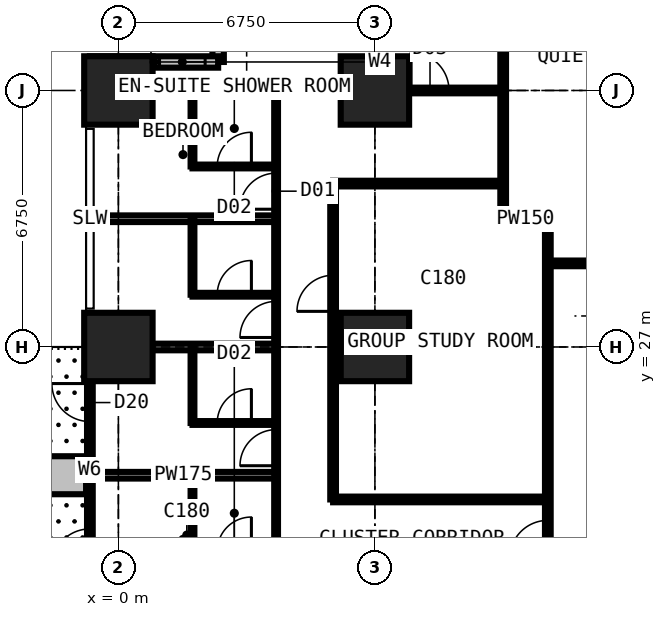
"""IFC4 building model, lengths in metres.
Left out: names, types, materials, properties, quantities, classifications, styles, units other than length and angle.
Written with IfcOpenShell. Run it as: python <this file> out.ifc"""

import sys

from ifc_helpers import new_model, si_unit, direction, frame, frame_2d, origin, origin_2d, place, context, subcontext, project, spatial, rectangle, extrude, element, fill, save


model = new_model("IFC4")
c1 = context("Model", 3, precision=1e-05, world=origin(), true_north=direction((0.0, 1.0)))
c2 = subcontext(c1, "Body", "Model", "MODEL_VIEW")
j1 = project(units=[si_unit("LENGTHUNIT", "METRE"), si_unit("PLANEANGLEUNIT", "RADIAN")], contexts=[c1])
p1 = place(None, origin())
s1 = spatial("IfcSite", under=j1, at=p1, CompositionType="ELEMENT")
p2 = place(p1, origin())
s2 = spatial("IfcBuilding", under=s1, at=p2, CompositionType="ELEMENT")
p3 = place(p2, frame((0.0, 0.0, 46.8)))
s3 = spatial("IfcBuildingStorey", under=s2, at=p3, CompositionType="ELEMENT", Elevation=46.8)
for number, where, z_axis, x_axis in (
    (1, (0.0, 27.0, 0.0), (0.0, 0.0, 1.0), (1.0, 0.0, 0.0)),
    (2, (0.0, 33.75, 0.0), (0.0, 0.0, 1.0), (1.0, 0.0, 0.0)),
    (3, (6.75, 27.0, 0.0), (0.0, 0.0, 1.0), (1.0, 0.0, 0.0)),
    (4, (6.75, 33.75, 0.0), (0.0, 0.0, 1.0), (1.0, 0.0, 0.0)),
):
    element("IfcColumn", number, at=place(p3, frame(where, z_axis=z_axis, x_axis=x_axis)), inside=s3, PredefinedType="COLUMN", context=c2, shape_type="SweptSolid", body=[
        extrude(rectangle(XDim=1.8, YDim=1.8, at=origin_2d()), origin(), (0.0, 0.0, 1.0), 3.6),
    ])
p4 = place(p3, frame((2.625, 37.875, 0.0), z_axis=(0.0, 0.0, 1.0), x_axis=(0.0, -1.0, 0.0)))
e5 = element("IfcWall", 5, at=p4, inside=s3, PredefinedType="SOLIDWALL", context=c2, shape_type="SweptSolid", body=[
    extrude(rectangle(XDim=3.375, YDim=0.3, at=frame_2d((1.688, 0.0))), origin(), (0.0, 0.0, 1.0), 3.375),
])
p5 = place(p4, frame((0.788, 0.0, 0.6)))
e6 = element("IfcOpeningElement", 6, at=p5, cuts=e5, PredefinedType="OPENING", context=c2, shape_type="SweptSolid", body=[
    extrude(rectangle(XDim=1.8, YDim=2.1, at=frame_2d((0.9, 1.05))), frame((0.0, 0.16, 0.0), z_axis=(0.0, -1.0, 0.0), x_axis=(1.0, 0.0, 0.0)), (0.0, 0.0, 1.0), 0.32),
])
p6 = place(p3, frame((2.625, 34.5, 0.0), z_axis=(0.0, 0.0, 1.0), x_axis=(-1.0, 0.0, 0.0)))
e7 = element("IfcWall", 7, at=p6, inside=s3, PredefinedType="SOLIDWALL", context=c2, shape_type="SweptSolid", body=[
    extrude(rectangle(XDim=3.375, YDim=0.3, at=frame_2d((1.688, 0.0))), origin(), (0.0, 0.0, 1.0), 3.375),
])
p7 = place(p6, frame((0.343, 0.0, 0.9)))
e8 = element("IfcOpeningElement", 8, at=p7, cuts=e7, PredefinedType="OPENING", context=c2, shape_type="SweptSolid", body=[
    extrude(rectangle(XDim=1.2, YDim=1.8, at=frame_2d((0.6, 0.9))), frame((0.0, 0.16, 0.0), z_axis=(0.0, -1.0, 0.0), x_axis=(1.0, 0.0, 0.0)), (0.0, 0.0, 1.0), 0.32),
])
p8 = place(p3, frame((-0.75, 20.25, 0.0), z_axis=(0.0, 0.0, 1.0), x_axis=(0.0, 1.0, 0.0)))
e9 = element("IfcWall", 9, at=p8, inside=s3, PredefinedType="SOLIDWALL", context=c2, shape_type="SweptSolid", body=[
    extrude(rectangle(XDim=6.75, YDim=0.15, at=frame_2d((3.375, 0.0))), origin(), (0.0, 0.0, 1.0), 3.375),
])
p9 = place(p8, frame((0.962, 0.0, 0.0)))
e10 = element("IfcOpeningElement", 10, at=p9, cuts=e9, PredefinedType="OPENING", context=c2, shape_type="SweptSolid", body=[
    extrude(rectangle(XDim=1.0, YDim=2.2, at=frame_2d((0.5, 1.1))), frame((0.0, 0.085, 0.0), z_axis=(0.0, -1.0, 0.0), x_axis=(1.0, 0.0, 0.0)), (0.0, 0.0, 1.0), 0.17),
])
p10 = place(p8, frame((2.025, 0.0, 0.9)))
e11 = element("IfcOpeningElement", 11, at=p10, cuts=e9, PredefinedType="OPENING", context=c2, shape_type="SweptSolid", body=[
    extrude(rectangle(XDim=1.2, YDim=1.8, at=frame_2d((0.6, 0.9))), frame((0.0, 0.085, 0.0), z_axis=(0.0, -1.0, 0.0), x_axis=(1.0, 0.0, 0.0)), (0.0, 0.0, 1.0), 0.17),
])
p11 = place(p8, frame((4.788, 0.0, 0.0)))
e12 = element("IfcOpeningElement", 12, at=p11, cuts=e9, PredefinedType="OPENING", context=c2, shape_type="SweptSolid", body=[
    extrude(rectangle(XDim=1.0, YDim=2.2, at=frame_2d((0.5, 1.1))), frame((0.0, 0.085, 0.0), z_axis=(0.0, -1.0, 0.0), x_axis=(1.0, 0.0, 0.0)), (0.0, 0.0, 1.0), 0.17),
])
p12 = place(p8, frame((3.525, 0.0, 0.9)))
e13 = element("IfcOpeningElement", 13, at=p12, cuts=e9, PredefinedType="OPENING", context=c2, shape_type="SweptSolid", body=[
    extrude(rectangle(XDim=1.2, YDim=1.8, at=frame_2d((0.6, 0.9))), frame((0.0, 0.085, 0.0), z_axis=(0.0, -1.0, 0.0), x_axis=(1.0, 0.0, 0.0)), (0.0, 0.0, 1.0), 0.17),
])
p13 = place(p3, frame((-0.85, 23.625, 0.0), z_axis=(0.0, 0.0, 1.0), x_axis=(-1.0, 0.0, 0.0)))
e14 = element("IfcWall", 14, at=p13, inside=s3, PredefinedType="USERDEFINED", context=c2, shape_type="SweptSolid", body=[
    extrude(rectangle(XDim=2.2, YDim=1.0, at=frame_2d((1.1, 0.0))), origin(), (0.0, 0.0, 1.0), 0.9),
])
p14 = place(p3, frame((-0.734, 23.625, 0.0), z_axis=(0.0, 0.0, 1.0), x_axis=(1.0, 0.0, 0.0)))
e15 = element("IfcWall", 15, at=p14, inside=s3, PredefinedType="PARTITIONING", context=c2, shape_type="SweptSolid", body=[
    extrude(rectangle(XDim=4.884, YDim=0.175, at=frame_2d((2.442, 0.0))), origin(), (0.0, 0.0, 1.0), 3.375),
])
p15 = place(p3, frame((-0.734, 27.0, 0.0), z_axis=(0.0, 0.0, 1.0), x_axis=(1.0, 0.0, 0.0)))
e16 = element("IfcWall", 16, at=p15, inside=s3, PredefinedType="PARTITIONING", context=c2, shape_type="SweptSolid", body=[
    extrude(rectangle(XDim=4.884, YDim=0.175, at=frame_2d((2.442, 0.0))), origin(), (0.0, 0.0, 1.0), 2.61),
])
p16 = place(p3, frame((-0.734, 30.375, 0.0), z_axis=(0.0, 0.0, 1.0), x_axis=(1.0, 0.0, 0.0)))
e17 = element("IfcWall", 17, at=p16, inside=s3, PredefinedType="PARTITIONING", context=c2, shape_type="SweptSolid", body=[
    extrude(rectangle(XDim=4.884, YDim=0.175, at=frame_2d((2.442, 0.0))), origin(), (0.0, 0.0, 1.0), 3.375),
])
p17 = place(p3, frame((-0.734, 33.75, 0.0), z_axis=(0.0, 0.0, 1.0), x_axis=(1.0, 0.0, 0.0)))
e18 = element("IfcWall", 18, at=p17, inside=s3, PredefinedType="PARTITIONING", context=c2, shape_type="SweptSolid", body=[
    extrude(rectangle(XDim=10.859, YDim=0.15, at=frame_2d((5.429, 0.0))), origin(), (0.0, 0.0, 1.0), 2.877),
])
p18 = place(p17, frame((8.434, 0.0, 0.0)))
e19 = element("IfcOpeningElement", 19, at=p18, cuts=e18, PredefinedType="OPENING", context=c2, shape_type="SweptSolid", body=[
    extrude(rectangle(XDim=1.0, YDim=2.2, at=frame_2d((0.5, 1.1))), frame((0.0, 0.085, 0.0), z_axis=(0.0, -1.0, 0.0), x_axis=(1.0, 0.0, 0.0)), (0.0, 0.0, 1.0), 0.17),
])
for number, where, z_axis, x_axis in (
    (20, (1.95, 21.625, 0.0), (0.0, 0.0, 1.0), (0.0, 1.0, 0.0)),
    (21, (1.95, 25.0, 0.0), (0.0, 0.0, 1.0), (0.0, 1.0, 0.0)),
):
    element("IfcWall", number, at=place(p3, frame(where, z_axis=z_axis, x_axis=x_axis)), inside=s3, PredefinedType="PARTITIONING", context=c2, shape_type="SweptSolid", body=[
        extrude(rectangle(XDim=2.0, YDim=0.1, at=frame_2d((1.0, 0.0))), origin(), (0.0, 0.0, 1.0), 3.375),
    ])
p19 = place(p3, frame((1.95, 25.0, 0.0), z_axis=(0.0, 0.0, 1.0), x_axis=(1.0, 0.0, 0.0)))
e22 = element("IfcWall", 22, at=p19, inside=s3, PredefinedType="PARTITIONING", context=c2, shape_type="SweptSolid", body=[
    extrude(rectangle(XDim=2.2, YDim=0.1, at=frame_2d((1.1, 0.0))), origin(), (0.0, 0.0, 1.0), 3.375),
])
p20 = place(p19, frame((0.65, 0.0, 0.0)))
e23 = element("IfcOpeningElement", 23, at=p20, cuts=e22, PredefinedType="OPENING", context=c2, shape_type="SweptSolid", body=[
    extrude(rectangle(XDim=0.9, YDim=2.2, at=frame_2d((0.45, 1.1))), frame((0.0, 0.06, 0.0), z_axis=(0.0, -1.0, 0.0), x_axis=(1.0, 0.0, 0.0)), (0.0, 0.0, 1.0), 0.12),
])
p21 = place(p3, frame((1.95, 28.375, 0.0), z_axis=(0.0, 0.0, 1.0), x_axis=(0.0, 1.0, 0.0)))
e24 = element("IfcWall", 24, at=p21, inside=s3, PredefinedType="PARTITIONING", context=c2, shape_type="SweptSolid", body=[
    extrude(rectangle(XDim=2.0, YDim=0.1, at=frame_2d((1.0, 0.0))), origin(), (0.0, 0.0, 1.0), 3.375),
])
p22 = place(p3, frame((1.95, 28.375, 0.0), z_axis=(0.0, 0.0, 1.0), x_axis=(1.0, 0.0, 0.0)))
e25 = element("IfcWall", 25, at=p22, inside=s3, PredefinedType="PARTITIONING", context=c2, shape_type="SweptSolid", body=[
    extrude(rectangle(XDim=2.2, YDim=0.1, at=frame_2d((1.1, 0.0))), origin(), (0.0, 0.0, 1.0), 3.375),
])
p23 = place(p22, frame((0.65, 0.0, 0.0)))
e26 = element("IfcOpeningElement", 26, at=p23, cuts=e25, PredefinedType="OPENING", context=c2, shape_type="SweptSolid", body=[
    extrude(rectangle(XDim=0.9, YDim=2.2, at=frame_2d((0.45, 1.1))), frame((0.0, 0.06, 0.0), z_axis=(0.0, -1.0, 0.0), x_axis=(1.0, 0.0, 0.0)), (0.0, 0.0, 1.0), 0.12),
])
p24 = place(p3, frame((1.95, 31.75, 0.0), z_axis=(0.0, 0.0, 1.0), x_axis=(0.0, 1.0, 0.0)))
e27 = element("IfcWall", 27, at=p24, inside=s3, PredefinedType="PARTITIONING", context=c2, shape_type="SweptSolid", body=[
    extrude(rectangle(XDim=2.0, YDim=0.1, at=frame_2d((1.0, 0.0))), origin(), (0.0, 0.0, 1.0), 3.375),
])
p25 = place(p3, frame((1.95, 31.75, 0.0), z_axis=(0.0, 0.0, 1.0), x_axis=(1.0, 0.0, 0.0)))
e28 = element("IfcWall", 28, at=p25, inside=s3, PredefinedType="PARTITIONING", context=c2, shape_type="SweptSolid", body=[
    extrude(rectangle(XDim=2.2, YDim=0.1, at=frame_2d((1.1, 0.0))), origin(), (0.0, 0.0, 1.0), 3.375),
])
p26 = place(p25, frame((0.65, 0.0, 0.0)))
e29 = element("IfcOpeningElement", 29, at=p26, cuts=e28, PredefinedType="OPENING", context=c2, shape_type="SweptSolid", body=[
    extrude(rectangle(XDim=0.9, YDim=2.2, at=frame_2d((0.45, 1.1))), frame((0.0, 0.06, 0.0), z_axis=(0.0, -1.0, 0.0), x_axis=(1.0, 0.0, 0.0)), (0.0, 0.0, 1.0), 0.12),
])
p27 = place(p3, frame((4.15, 10.125, 0.0), z_axis=(0.0, 0.0, 1.0), x_axis=(0.0, 1.0, 0.0)))
e30 = element("IfcWall", 30, at=p27, inside=s3, PredefinedType="PARTITIONING", context=c2, shape_type="SweptSolid", body=[
    extrude(rectangle(XDim=23.625, YDim=0.1, at=frame_2d((11.812, 0.0))), origin(), (0.0, 0.0, 1.0), 3.375),
])
p28 = place(p27, frame((0.2, 0.0, 0.0)))
e31 = element("IfcOpeningElement", 31, at=p28, cuts=e30, PredefinedType="OPENING", context=c2, shape_type="SweptSolid", body=[
    extrude(rectangle(XDim=0.95, YDim=2.2, at=frame_2d((0.475, 1.1))), frame((0.0, 0.06, 0.0), z_axis=(0.0, -1.0, 0.0), x_axis=(1.0, 0.0, 0.0)), (0.0, 0.0, 1.0), 0.12),
])
p29 = place(p27, frame((3.625, 0.0, 0.0)))
e32 = element("IfcOpeningElement", 32, at=p29, cuts=e30, PredefinedType="OPENING", context=c2, shape_type="SweptSolid", body=[
    extrude(rectangle(XDim=0.95, YDim=2.2, at=frame_2d((0.475, 1.1))), frame((0.0, 0.06, 0.0), z_axis=(0.0, -1.0, 0.0), x_axis=(1.0, 0.0, 0.0)), (0.0, 0.0, 1.0), 0.12),
])
p30 = place(p27, frame((7.0, 0.0, 0.0)))
e33 = element("IfcOpeningElement", 33, at=p30, cuts=e30, PredefinedType="OPENING", context=c2, shape_type="SweptSolid", body=[
    extrude(rectangle(XDim=0.95, YDim=2.2, at=frame_2d((0.475, 1.1))), frame((0.0, 0.06, 0.0), z_axis=(0.0, -1.0, 0.0), x_axis=(1.0, 0.0, 0.0)), (0.0, 0.0, 1.0), 0.12),
])
p31 = place(p27, frame((10.375, 0.0, 0.0)))
e34 = element("IfcOpeningElement", 34, at=p31, cuts=e30, PredefinedType="OPENING", context=c2, shape_type="SweptSolid", body=[
    extrude(rectangle(XDim=0.95, YDim=2.2, at=frame_2d((0.475, 1.1))), frame((0.0, 0.06, 0.0), z_axis=(0.0, -1.0, 0.0), x_axis=(1.0, 0.0, 0.0)), (0.0, 0.0, 1.0), 0.12),
])
p32 = place(p27, frame((13.75, 0.0, 0.0)))
e35 = element("IfcOpeningElement", 35, at=p32, cuts=e30, PredefinedType="OPENING", context=c2, shape_type="SweptSolid", body=[
    extrude(rectangle(XDim=0.95, YDim=2.2, at=frame_2d((0.475, 1.1))), frame((0.0, 0.06, 0.0), z_axis=(0.0, -1.0, 0.0), x_axis=(1.0, 0.0, 0.0)), (0.0, 0.0, 1.0), 0.12),
])
p33 = place(p27, frame((17.125, 0.0, 0.0)))
e36 = element("IfcOpeningElement", 36, at=p33, cuts=e30, PredefinedType="OPENING", context=c2, shape_type="SweptSolid", body=[
    extrude(rectangle(XDim=0.95, YDim=2.2, at=frame_2d((0.475, 1.1))), frame((0.0, 0.06, 0.0), z_axis=(0.0, -1.0, 0.0), x_axis=(1.0, 0.0, 0.0)), (0.0, 0.0, 1.0), 0.12),
])
p34 = place(p27, frame((20.5, 0.0, 0.0)))
e37 = element("IfcOpeningElement", 37, at=p34, cuts=e30, PredefinedType="OPENING", context=c2, shape_type="SweptSolid", body=[
    extrude(rectangle(XDim=0.95, YDim=2.2, at=frame_2d((0.475, 1.1))), frame((0.0, 0.06, 0.0), z_axis=(0.0, -1.0, 0.0), x_axis=(1.0, 0.0, 0.0)), (0.0, 0.0, 1.0), 0.12),
])
p35 = place(p3, frame((5.65, 22.988, 0.0), z_axis=(0.0, 0.0, 1.0), x_axis=(0.0, 1.0, 0.0)))
e38 = element("IfcWall", 38, at=p35, inside=s3, PredefinedType="PARTITIONING", context=c2, shape_type="SweptSolid", body=[
    extrude(rectangle(XDim=8.312, YDim=0.15, at=frame_2d((4.156, 0.0))), origin(), (0.0, 0.0, 1.0), 3.375),
])
p36 = place(p35, frame((4.95, 0.0, 0.0)))
e39 = element("IfcOpeningElement", 39, at=p36, cuts=e38, PredefinedType="OPENING", context=c2, shape_type="SweptSolid", body=[
    extrude(rectangle(XDim=0.95, YDim=2.2, at=frame_2d((0.475, 1.1))), frame((0.0, 0.085, 0.0), z_axis=(0.0, -1.0, 0.0), x_axis=(1.0, 0.0, 0.0)), (0.0, 0.0, 1.0), 0.17),
])
p37 = place(p3, frame((5.65, 22.988, 0.0), z_axis=(0.0, 0.0, 1.0), x_axis=(1.0, 0.0, 0.0)))
e40 = element("IfcWall", 40, at=p37, inside=s3, PredefinedType="PARTITIONING", context=c2, shape_type="SweptSolid", body=[
    extrude(rectangle(XDim=5.65, YDim=0.15, at=frame_2d((2.825, 0.0))), origin(), (0.0, 0.0, 1.0), 3.375),
])
p38 = place(p3, frame((5.65, 31.3, 0.0), z_axis=(0.0, 0.0, 1.0), x_axis=(1.0, 0.0, 0.0)))
e41 = element("IfcWall", 41, at=p38, inside=s3, PredefinedType="PARTITIONING", context=c2, shape_type="SweptSolid", body=[
    extrude(rectangle(XDim=4.475, YDim=0.15, at=frame_2d((2.238, 0.0))), origin(), (0.0, 0.0, 1.0), 3.375),
])
p39 = place(p3, frame((10.125, 30.375, 0.0), z_axis=(0.0, 0.0, 1.0), x_axis=(0.0, 1.0, 0.0)))
e42 = element("IfcWall", 42, at=p39, inside=s3, PredefinedType="PARTITIONING", context=c2, shape_type="SweptSolid", body=[
    extrude(rectangle(XDim=10.859, YDim=0.15, at=frame_2d((5.429, 0.0))), origin(), (0.0, 0.0, 1.0), 3.375),
])
p40 = place(p3, frame((10.125, 30.375, 0.0), z_axis=(0.0, 0.0, 1.0), x_axis=(1.0, 0.0, 0.0)))
e43 = element("IfcWall", 43, at=p40, inside=s3, PredefinedType="PARTITIONING", context=c2, shape_type="SweptSolid", body=[
    extrude(rectangle(XDim=1.175, YDim=0.15, at=frame_2d((0.587, 0.0))), origin(), (0.0, 0.0, 1.0), 3.375),
])
p41 = place(p3, frame((11.3, 11.3, 0.0), z_axis=(0.0, 0.0, 1.0), x_axis=(0.0, 1.0, 0.0)))
e44 = element("IfcWall", 44, at=p41, inside=s3, PredefinedType="PARTITIONING", context=c2, shape_type="SweptSolid", body=[
    extrude(rectangle(XDim=19.075, YDim=0.15, at=frame_2d((9.538, 0.0))), origin(), (0.0, 0.0, 1.0), 3.375),
])
p42 = place(p41, frame((10.137, 0.0, 0.0)))
e45 = element("IfcOpeningElement", 45, at=p42, cuts=e44, PredefinedType="OPENING", context=c2, shape_type="SweptSolid", body=[
    extrude(rectangle(XDim=1.0, YDim=2.2, at=frame_2d((0.5, 1.1))), frame((0.0, 0.085, 0.0), z_axis=(0.0, -1.0, 0.0), x_axis=(1.0, 0.0, 0.0)), (0.0, 0.0, 1.0), 0.17),
])
p43 = place(p3, frame((11.3, 29.2, 0.0), z_axis=(0.0, 0.0, 1.0), x_axis=(1.0, 0.0, 0.0)))
e46 = element("IfcWall", 46, at=p43, inside=s3, PredefinedType="PARTITIONING", context=c2, shape_type="SweptSolid", body=[
    extrude(rectangle(XDim=19.075, YDim=0.15, at=frame_2d((9.538, 0.0))), origin(), (0.0, 0.0, 1.0), 3.375),
])
p44 = place(p43, frame((14.25, 0.0, 0.0)))
e47 = element("IfcOpeningElement", 47, at=p44, cuts=e46, PredefinedType="OPENING", context=c2, shape_type="SweptSolid", body=[
    extrude(rectangle(XDim=1.0, YDim=2.2, at=frame_2d((0.5, 1.1))), frame((0.0, 0.085, 0.0), z_axis=(0.0, -1.0, 0.0), x_axis=(1.0, 0.0, 0.0)), (0.0, 0.0, 1.0), 0.17),
])
p45 = place(p43, frame((16.35, 0.0, 0.0)))
e48 = element("IfcOpeningElement", 48, at=p45, cuts=e46, PredefinedType="OPENING", context=c2, shape_type="SweptSolid", body=[
    extrude(rectangle(XDim=1.0, YDim=2.2, at=frame_2d((0.5, 1.1))), frame((0.0, 0.085, 0.0), z_axis=(0.0, -1.0, 0.0), x_axis=(1.0, 0.0, 0.0)), (0.0, 0.0, 1.0), 0.17),
])
p46 = place(p43, frame((8.859, 0.0, 0.0)))
e49 = element("IfcOpeningElement", 49, at=p46, cuts=e46, PredefinedType="OPENING", context=c2, shape_type="SweptSolid", body=[
    extrude(rectangle(XDim=1.5, YDim=2.2, at=frame_2d((0.75, 1.1))), frame((0.0, 0.085, 0.0), z_axis=(0.0, -1.0, 0.0), x_axis=(1.0, 0.0, 0.0)), (0.0, 0.0, 1.0), 0.17),
])
p47 = place(p7, origin())
e50 = element("IfcWindow", 50, at=p47, inside=s3, PartitioningType="SINGLE_PANEL", PredefinedType="WINDOW", context=c2, shape_type="SweptSolid", body=[
    extrude(rectangle(XDim=1.2, YDim=1.8, at=frame_2d((0.6, 0.9))), frame((0.0, 0.03, 0.0), z_axis=(0.0, -1.0, 0.0), x_axis=(1.0, 0.0, 0.0)), (0.0, 0.0, 1.0), 0.06),
])
fill(e8, e50)
p48 = place(p9, origin())
e51 = element("IfcDoor", 51, at=p48, inside=s3, OperationType="SINGLE_SWING_LEFT", PredefinedType="DOOR", context=c2, shape_type="SweptSolid", body=[
    extrude(rectangle(XDim=1.0, YDim=2.2, at=frame_2d((0.5, 1.1))), frame((0.0, 0.025, 0.0), z_axis=(0.0, -1.0, 0.0), x_axis=(1.0, 0.0, 0.0)), (0.0, 0.0, 1.0), 0.05),
])
fill(e10, e51)
p49 = place(p10, origin())
e52 = element("IfcWindow", 52, at=p49, inside=s3, PartitioningType="SINGLE_PANEL", PredefinedType="WINDOW", context=c2, shape_type="SweptSolid", body=[
    extrude(rectangle(XDim=1.2, YDim=1.8, at=frame_2d((0.6, 0.9))), frame((0.0, 0.03, 0.0), z_axis=(0.0, -1.0, 0.0), x_axis=(1.0, 0.0, 0.0)), (0.0, 0.0, 1.0), 0.06),
])
fill(e11, e52)
p50 = place(p11, origin())
e53 = element("IfcDoor", 53, at=p50, inside=s3, OperationType="SINGLE_SWING_RIGHT", PredefinedType="DOOR", context=c2, shape_type="SweptSolid", body=[
    extrude(rectangle(XDim=1.0, YDim=2.2, at=frame_2d((0.5, 1.1))), frame((0.0, 0.025, 0.0), z_axis=(0.0, -1.0, 0.0), x_axis=(1.0, 0.0, 0.0)), (0.0, 0.0, 1.0), 0.05),
])
fill(e12, e53)
p51 = place(p12, origin())
e54 = element("IfcWindow", 54, at=p51, inside=s3, PartitioningType="SINGLE_PANEL", PredefinedType="WINDOW", context=c2, shape_type="SweptSolid", body=[
    extrude(rectangle(XDim=1.2, YDim=1.8, at=frame_2d((0.6, 0.9))), frame((0.0, 0.03, 0.0), z_axis=(0.0, -1.0, 0.0), x_axis=(1.0, 0.0, 0.0)), (0.0, 0.0, 1.0), 0.06),
])
fill(e13, e54)
p52 = place(p32, origin())
e55 = element("IfcDoor", 55, at=p52, inside=s3, OperationType="SINGLE_SWING_LEFT", PredefinedType="DOOR", context=c2, shape_type="SweptSolid", body=[
    extrude(rectangle(XDim=0.95, YDim=2.2, at=frame_2d((0.475, 1.1))), frame((0.0, 0.025, 0.0), z_axis=(0.0, -1.0, 0.0), x_axis=(1.0, 0.0, 0.0)), (0.0, 0.0, 1.0), 0.05),
])
fill(e35, e55)
p53 = place(p20, origin())
e56 = element("IfcDoor", 56, at=p53, inside=s3, OperationType="SINGLE_SWING_RIGHT", PredefinedType="DOOR", context=c2, shape_type="SweptSolid", body=[
    extrude(rectangle(XDim=0.9, YDim=2.2, at=frame_2d((0.45, 1.1))), frame((0.0, 0.025, 0.0), z_axis=(0.0, -1.0, 0.0), x_axis=(1.0, 0.0, 0.0)), (0.0, 0.0, 1.0), 0.05),
])
fill(e23, e56)
p54 = place(p33, origin())
e57 = element("IfcDoor", 57, at=p54, inside=s3, OperationType="SINGLE_SWING_LEFT", PredefinedType="DOOR", context=c2, shape_type="SweptSolid", body=[
    extrude(rectangle(XDim=0.95, YDim=2.2, at=frame_2d((0.475, 1.1))), frame((0.0, 0.025, 0.0), z_axis=(0.0, -1.0, 0.0), x_axis=(1.0, 0.0, 0.0)), (0.0, 0.0, 1.0), 0.05),
])
fill(e36, e57)
p55 = place(p23, origin())
e58 = element("IfcDoor", 58, at=p55, inside=s3, OperationType="SINGLE_SWING_RIGHT", PredefinedType="DOOR", context=c2, shape_type="SweptSolid", body=[
    extrude(rectangle(XDim=0.9, YDim=2.2, at=frame_2d((0.45, 1.1))), frame((0.0, 0.025, 0.0), z_axis=(0.0, -1.0, 0.0), x_axis=(1.0, 0.0, 0.0)), (0.0, 0.0, 1.0), 0.05),
])
fill(e26, e58)
p56 = place(p34, origin())
e59 = element("IfcDoor", 59, at=p56, inside=s3, OperationType="SINGLE_SWING_LEFT", PredefinedType="DOOR", context=c2, shape_type="SweptSolid", body=[
    extrude(rectangle(XDim=0.95, YDim=2.2, at=frame_2d((0.475, 1.1))), frame((0.0, 0.025, 0.0), z_axis=(0.0, -1.0, 0.0), x_axis=(1.0, 0.0, 0.0)), (0.0, 0.0, 1.0), 0.05),
])
fill(e37, e59)
p57 = place(p26, origin())
e60 = element("IfcDoor", 60, at=p57, inside=s3, OperationType="SINGLE_SWING_RIGHT", PredefinedType="DOOR", context=c2, shape_type="SweptSolid", body=[
    extrude(rectangle(XDim=0.9, YDim=2.2, at=frame_2d((0.45, 1.1))), frame((0.0, 0.025, 0.0), z_axis=(0.0, -1.0, 0.0), x_axis=(1.0, 0.0, 0.0)), (0.0, 0.0, 1.0), 0.05),
])
fill(e29, e60)
p58 = place(p18, origin())
e61 = element("IfcDoor", 61, at=p58, inside=s3, OperationType="SINGLE_SWING_LEFT", PredefinedType="DOOR", context=c2, shape_type="SweptSolid", body=[
    extrude(rectangle(XDim=1.0, YDim=2.2, at=frame_2d((0.5, 1.1))), frame((0.0, 0.025, 0.0), z_axis=(0.0, -1.0, 0.0), x_axis=(1.0, 0.0, 0.0)), (0.0, 0.0, 1.0), 0.05),
])
fill(e19, e61)
p59 = place(p42, origin())
e62 = element("IfcDoor", 62, at=p59, inside=s3, OperationType="SINGLE_SWING_LEFT", PredefinedType="DOOR", context=c2, shape_type="SweptSolid", body=[
    extrude(rectangle(XDim=1.0, YDim=2.2, at=frame_2d((0.5, 1.1))), frame((0.0, 0.025, 0.0), z_axis=(0.0, -1.0, 0.0), x_axis=(1.0, 0.0, 0.0)), (0.0, 0.0, 1.0), 0.05),
])
fill(e45, e62)
p60 = place(p36, origin())
e63 = element("IfcDoor", 63, at=p60, inside=s3, OperationType="SINGLE_SWING_LEFT", PredefinedType="DOOR", context=c2, shape_type="SweptSolid", body=[
    extrude(rectangle(XDim=0.95, YDim=2.2, at=frame_2d((0.475, 1.1))), frame((0.0, 0.025, 0.0), z_axis=(0.0, -1.0, 0.0), x_axis=(1.0, 0.0, 0.0)), (0.0, 0.0, 1.0), 0.05),
])
fill(e39, e63)
save(model, sys.argv[1])
